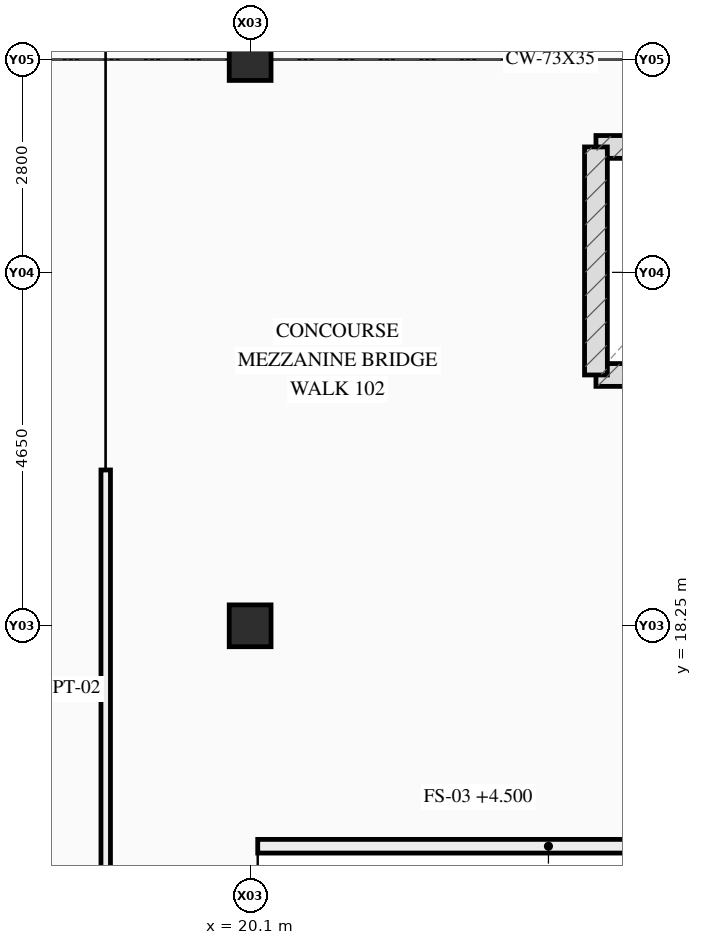
"""IFC4 building model, lengths in metres.
Left out: names, types, materials, properties, quantities, classifications, styles, units other than length and angle.
Written with IfcOpenShell. Run it as: python <this file> out.ifc"""

import sys

from ifc_helpers import new_model, si_unit, direction, frame, frame_2d, origin, origin_2d, place, context, subcontext, project, spatial, rectangle, extrude, element, save


model = new_model("IFC4")
c1 = context("Model", 3, precision=1e-05, world=origin(), true_north=direction((0.0, 1.0)))
c2 = subcontext(c1, "Body", "Model", "MODEL_VIEW")
j1 = project(units=[si_unit("LENGTHUNIT", "METRE"), si_unit("PLANEANGLEUNIT", "RADIAN")], contexts=[c1])
p1 = place(None, origin())
s1 = spatial("IfcSite", under=j1, at=p1, CompositionType="ELEMENT")
p2 = place(p1, origin())
s2 = spatial("IfcBuilding", under=s1, at=p2, CompositionType="ELEMENT")
p3 = place(p2, frame((0.0, 0.0, 4.5)))
s3 = spatial("IfcBuildingStorey", under=s2, at=p3, CompositionType="ELEMENT", Elevation=4.5)
for number, where, z_axis, x_axis in (
    (1, (20.1, 18.25, 0.0), (0.0, 0.0, 1.0), (1.0, 0.0, 0.0)),
    (2, (20.1, 25.7, 0.0), (0.0, 0.0, 1.0), (1.0, 0.0, 0.0)),
):
    element("IfcColumn", number, at=place(p3, frame(where, z_axis=z_axis, x_axis=x_axis)), inside=s3, PredefinedType="COLUMN", context=c2, shape_type="SweptSolid", body=[
        extrude(rectangle(XDim=0.55, YDim=0.55, at=origin_2d()), origin(), (0.0, 0.0, 1.0), 4.5),
    ])
p4 = place(p3, frame((24.65, 21.55, 0.0), z_axis=(0.0, 0.0, 1.0), x_axis=(1.0, 0.0, 0.0)))
e3 = element("IfcWall", 3, at=p4, inside=s3, PredefinedType="SHEAR", context=c2, shape_type="SweptSolid", body=[
    extrude(rectangle(XDim=2.7, YDim=0.3, at=frame_2d((1.35, 0.0))), origin(), (0.0, 0.0, 1.0), 4.25),
])
p5 = place(p4, frame((0.8, 0.0, 0.0)))
e4 = element("IfcOpeningElement", 4, at=p5, cuts=e3, PredefinedType="OPENING", context=c2, shape_type="SweptSolid", body=[
    extrude(rectangle(XDim=1.1, YDim=2.2, at=frame_2d((0.55, 1.1))), frame((0.0, 0.16, 0.0), z_axis=(0.0, -1.0, 0.0), x_axis=(1.0, 0.0, 0.0)), (0.0, 0.0, 1.0), 0.32),
])
p6 = place(p3, frame((24.65, 24.55, 0.0), z_axis=(0.0, 0.0, 1.0), x_axis=(1.0, 0.0, 0.0)))
e5 = element("IfcWall", 5, at=p6, inside=s3, PredefinedType="SHEAR", context=c2, shape_type="SweptSolid", body=[
    extrude(rectangle(XDim=2.7, YDim=0.3, at=frame_2d((1.35, 0.0))), origin(), (0.0, 0.0, 1.0), 4.25),
])
p7 = place(p3, frame((24.65, 21.55, 0.0), z_axis=(0.0, 0.0, 1.0), x_axis=(0.0, 1.0, 0.0)))
e6 = element("IfcWall", 6, at=p7, inside=s3, PredefinedType="SHEAR", context=c2, shape_type="SweptSolid", body=[
    extrude(rectangle(XDim=3.0, YDim=0.3, at=frame_2d((1.5, 0.0))), origin(), (0.0, 0.0, 1.0), 4.25),
])
p8 = place(p3, frame((20.2, 15.35, 0.0), z_axis=(0.0, 0.0, 1.0), x_axis=(1.0, 0.0, 0.0)))
e7 = element("IfcWall", 7, at=p8, inside=s3, PredefinedType="PARAPET", context=c2, shape_type="SweptSolid", body=[
    extrude(rectangle(XDim=7.65, YDim=0.18, at=frame_2d((3.825, 0.0))), origin(), (0.0, 0.0, 1.0), 1.2),
])
p9 = place(p3, frame((18.2, 6.7, 0.0), z_axis=(0.0, 0.0, 1.0), x_axis=(0.0, 1.0, 0.0)))
e8 = element("IfcWall", 8, at=p9, inside=s3, PredefinedType="PARTITIONING", context=c2, shape_type="SweptSolid", body=[
    extrude(rectangle(XDim=13.6, YDim=0.125, at=frame_2d((6.8, 0.0))), origin(), (0.0, 0.0, 1.0), 3.3),
])
p10 = place(p9, frame((6.0, 0.0, 0.0)))
e9 = element("IfcOpeningElement", 9, at=p10, cuts=e8, PredefinedType="OPENING", context=c2, shape_type="SweptSolid", body=[
    extrude(rectangle(XDim=1.6, YDim=2.2, at=frame_2d((0.8, 1.1))), frame((0.0, 0.073, 0.0), z_axis=(0.0, -1.0, 0.0), x_axis=(1.0, 0.0, 0.0)), (0.0, 0.0, 1.0), 0.145),
])
save(model, sys.argv[1])
